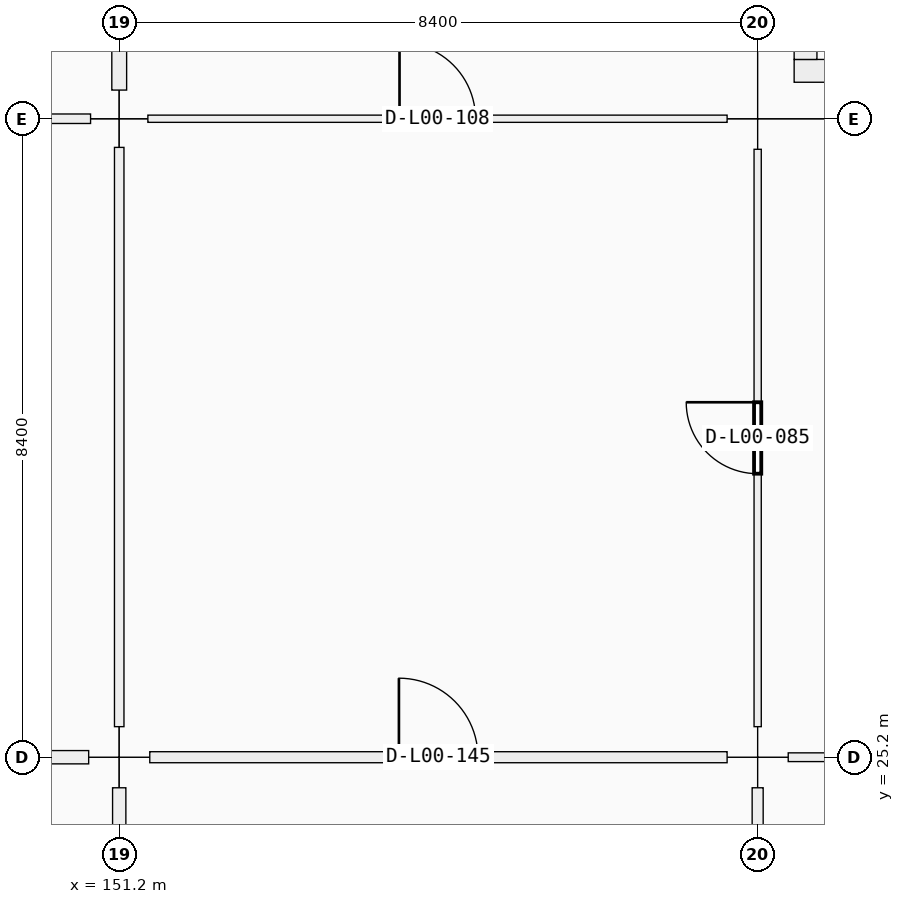
"""IFC4 building model, lengths in metres.
Left out: names, types, materials, properties, quantities, classifications, styles, units other than length and angle.
Written with IfcOpenShell. Run it as: python <this file> out.ifc"""

import sys

from ifc_helpers import new_model, si_unit, direction, frame, frame_2d, origin, origin_2d, place, context, subcontext, project, spatial, rectangle, extrude, element, fill, save


model = new_model("IFC4")
c1 = context("Model", 3, precision=1e-05, world=origin(), true_north=direction((0.0, 1.0)))
c2 = subcontext(c1, "Body", "Model", "MODEL_VIEW")
j1 = project(units=[si_unit("LENGTHUNIT", "METRE"), si_unit("PLANEANGLEUNIT", "RADIAN")], contexts=[c1])
p1 = place(None, origin())
s1 = spatial("IfcSite", under=j1, at=p1, CompositionType="ELEMENT")
p2 = place(p1, origin())
s2 = spatial("IfcBuilding", under=s1, at=p2, CompositionType="ELEMENT")
p3 = place(p2, origin())
s3 = spatial("IfcBuildingStorey", under=s2, at=p3, CompositionType="ELEMENT", Elevation=0.0)
p4 = place(p3, frame((151.2, 25.2, 0.0), z_axis=(0.0, 0.0, 1.0), x_axis=(1.0, 0.0, 0.0)))
e1 = element("IfcColumn", 1, at=p4, inside=s3, PredefinedType="COLUMN", context=c2, shape_type="SweptSolid", body=[
    extrude(rectangle(XDim=0.8, YDim=0.8, at=origin_2d()), origin(), (0.0, 0.0, 1.0), 5.76),
])
p5 = place(p3, frame((151.2, 33.6, 0.0), z_axis=(0.0, 0.0, 1.0), x_axis=(1.0, 0.0, 0.0)))
e2 = element("IfcColumn", 2, at=p5, inside=s3, PredefinedType="COLUMN", context=c2, shape_type="SweptSolid", body=[
    extrude(rectangle(XDim=0.75, YDim=0.75, at=origin_2d()), origin(), (0.0, 0.0, 1.0), 5.51),
])
for number, where, z_axis, x_axis in (
    (3, (159.6, 25.2, 0.0), (0.0, 0.0, 1.0), (1.0, 0.0, 0.0)),
    (4, (159.6, 33.6, 0.0), (0.0, 0.0, 1.0), (1.0, 0.0, 0.0)),
):
    element("IfcColumn", number, at=place(p3, frame(where, z_axis=z_axis, x_axis=x_axis)), inside=s3, PredefinedType="COLUMN", context=c2, shape_type="SweptSolid", body=[
        extrude(rectangle(XDim=0.8, YDim=0.8, at=origin_2d()), origin(), (0.0, 0.0, 1.0), 5.76),
    ])
p6 = place(p3, frame((167.52, 34.23, 0.0), z_axis=(0.0, 0.0, 1.0), x_axis=(-1.0, 0.0, 0.0)))
e5 = element("IfcWall", 5, at=p6, inside=s3, PredefinedType="SHEAR", context=c2, shape_type="SweptSolid", body=[
    extrude(rectangle(XDim=7.44, YDim=0.3, at=frame_2d((3.72, 0.0))), origin(), (0.0, 0.0, 1.0), 5.76),
])
p7 = place(p6, frame((1.28, 0.0, 0.0)))
e6 = element("IfcOpeningElement", 6, at=p7, cuts=e5, PredefinedType="OPENING", context=c2, shape_type="SweptSolid", body=[
    extrude(rectangle(XDim=1.5, YDim=2.15, at=frame_2d((0.75, 1.075))), frame((0.0, 0.15, 0.0), z_axis=(0.0, -1.0, 0.0), x_axis=(1.0, 0.0, 0.0)), (0.0, 0.0, 1.0), 0.3),
])
p8 = place(p3, frame((160.23, 34.38, 0.0), z_axis=(0.0, 0.0, 1.0), x_axis=(0.0, 1.0, 0.0)))
e7 = element("IfcWall", 7, at=p8, inside=s3, PredefinedType="SHEAR", context=c2, shape_type="SweptSolid", body=[
    extrude(rectangle(XDim=6.84, YDim=0.3, at=frame_2d((3.42, 0.0))), origin(), (0.0, 0.0, 1.0), 5.76),
])
p9 = place(p3, frame((143.202, 25.2, 0.0), z_axis=(0.0, 0.0, 1.0), x_axis=(1.0, 0.0, 0.0)))
e8 = element("IfcWall", 8, at=p9, inside=s3, PredefinedType="PARTITIONING", context=c2, shape_type="SweptSolid", body=[
    extrude(rectangle(XDim=7.596, YDim=0.175, at=frame_2d((3.798, 0.0))), origin(), (0.0, 0.0, 1.0), 3.66),
])
p10 = place(p9, frame((3.333, 0.0, 0.0)))
e9 = element("IfcOpeningElement", 9, at=p10, cuts=e8, PredefinedType="OPENING", context=c2, shape_type="SweptSolid", body=[
    extrude(rectangle(XDim=0.93, YDim=2.12, at=frame_2d((0.465, 1.06))), frame((0.0, 0.087, 0.0), z_axis=(0.0, -1.0, 0.0), x_axis=(1.0, 0.0, 0.0)), (0.0, 0.0, 1.0), 0.175),
])
p11 = place(p3, frame((143.202, 33.6, 0.0), z_axis=(0.0, 0.0, 1.0), x_axis=(1.0, 0.0, 0.0)))
e10 = element("IfcWall", 10, at=p11, inside=s3, PredefinedType="PARTITIONING", context=c2, shape_type="SweptSolid", body=[
    extrude(rectangle(XDim=7.621, YDim=0.125, at=frame_2d((3.811, 0.0))), origin(), (0.0, 0.0, 1.0), 3.66),
])
p12 = place(p11, frame((3.271, 0.0, 0.0)))
e11 = element("IfcOpeningElement", 11, at=p12, cuts=e10, PredefinedType="OPENING", context=c2, shape_type="SweptSolid", body=[
    extrude(rectangle(XDim=1.08, YDim=2.25, at=frame_2d((0.54, 1.125))), frame((0.0, 0.062, 0.0), z_axis=(0.0, -1.0, 0.0), x_axis=(1.0, 0.0, 0.0)), (0.0, 0.0, 1.0), 0.125),
])
p13 = place(p3, frame((151.602, 25.2, 0.0), z_axis=(0.0, 0.0, 1.0), x_axis=(1.0, 0.0, 0.0)))
e12 = element("IfcWall", 12, at=p13, inside=s3, PredefinedType="PARTITIONING", context=c2, shape_type="SweptSolid", body=[
    extrude(rectangle(XDim=7.596, YDim=0.145, at=frame_2d((3.798, 0.0))), origin(), (0.0, 0.0, 1.0), 3.66),
])
p14 = place(p13, frame((3.278, 0.0, 0.0)))
e13 = element("IfcOpeningElement", 13, at=p14, cuts=e12, PredefinedType="OPENING", context=c2, shape_type="SweptSolid", body=[
    extrude(rectangle(XDim=1.04, YDim=2.2, at=frame_2d((0.52, 1.1))), frame((0.0, 0.073, 0.0), z_axis=(0.0, -1.0, 0.0), x_axis=(1.0, 0.0, 0.0)), (0.0, 0.0, 1.0), 0.145),
])
p15 = place(p3, frame((151.577, 33.6, 0.0), z_axis=(0.0, 0.0, 1.0), x_axis=(1.0, 0.0, 0.0)))
e14 = element("IfcWall", 14, at=p15, inside=s3, PredefinedType="PARTITIONING", context=c2, shape_type="SweptSolid", body=[
    extrude(rectangle(XDim=7.621, YDim=0.095, at=frame_2d((3.811, 0.0))), origin(), (0.0, 0.0, 1.0), 3.66),
])
p16 = place(p15, frame((3.311, 0.0, 0.0)))
e15 = element("IfcOpeningElement", 15, at=p16, cuts=e14, PredefinedType="OPENING", context=c2, shape_type="SweptSolid", body=[
    extrude(rectangle(XDim=1.0, YDim=2.2, at=frame_2d((0.5, 1.1))), frame((0.0, 0.047, 0.0), z_axis=(0.0, -1.0, 0.0), x_axis=(1.0, 0.0, 0.0)), (0.0, 0.0, 1.0), 0.095),
])
p17 = place(p3, frame((160.002, 25.2, 0.0), z_axis=(0.0, 0.0, 1.0), x_axis=(1.0, 0.0, 0.0)))
e16 = element("IfcWall", 16, at=p17, inside=s3, PredefinedType="PARTITIONING", context=c2, shape_type="SweptSolid", body=[
    extrude(rectangle(XDim=7.596, YDim=0.115, at=frame_2d((3.798, 0.0))), origin(), (0.0, 0.0, 1.0), 3.66),
])
p18 = place(p17, frame((3.268, 0.0, 0.0)))
e17 = element("IfcOpeningElement", 17, at=p18, cuts=e16, PredefinedType="OPENING", context=c2, shape_type="SweptSolid", body=[
    extrude(rectangle(XDim=1.06, YDim=2.25, at=frame_2d((0.53, 1.125))), frame((0.0, 0.058, 0.0), z_axis=(0.0, -1.0, 0.0), x_axis=(1.0, 0.0, 0.0)), (0.0, 0.0, 1.0), 0.115),
])
p19 = place(p3, frame((151.2, 17.202, 0.0), z_axis=(0.0, 0.0, 1.0), x_axis=(0.0, 1.0, 0.0)))
e18 = element("IfcWall", 18, at=p19, inside=s3, PredefinedType="PARTITIONING", context=c2, shape_type="SweptSolid", body=[
    extrude(rectangle(XDim=7.596, YDim=0.175, at=frame_2d((3.798, 0.0))), origin(), (0.0, 0.0, 1.0), 3.66),
])
p20 = place(p19, frame((3.278, 0.0, 0.0)))
e19 = element("IfcOpeningElement", 19, at=p20, cuts=e18, PredefinedType="OPENING", context=c2, shape_type="SweptSolid", body=[
    extrude(rectangle(XDim=1.04, YDim=2.2, at=frame_2d((0.52, 1.1))), frame((0.0, 0.087, 0.0), z_axis=(0.0, -1.0, 0.0), x_axis=(1.0, 0.0, 0.0)), (0.0, 0.0, 1.0), 0.175),
])
p21 = place(p3, frame((151.2, 25.602, 0.0), z_axis=(0.0, 0.0, 1.0), x_axis=(0.0, 1.0, 0.0)))
e20 = element("IfcWall", 20, at=p21, inside=s3, PredefinedType="PARTITIONING", context=c2, shape_type="SweptSolid", body=[
    extrude(rectangle(XDim=7.621, YDim=0.125, at=frame_2d((3.811, 0.0))), origin(), (0.0, 0.0, 1.0), 3.66),
])
p22 = place(p21, frame((3.301, 0.0, 0.0)))
e21 = element("IfcOpeningElement", 21, at=p22, cuts=e20, PredefinedType="OPENING", context=c2, shape_type="SweptSolid", body=[
    extrude(rectangle(XDim=1.02, YDim=2.2, at=frame_2d((0.51, 1.1))), frame((0.0, 0.062, 0.0), z_axis=(0.0, -1.0, 0.0), x_axis=(1.0, 0.0, 0.0)), (0.0, 0.0, 1.0), 0.125),
])
p23 = place(p3, frame((151.2, 33.977, 0.0), z_axis=(0.0, 0.0, 1.0), x_axis=(0.0, 1.0, 0.0)))
e22 = element("IfcWall", 22, at=p23, inside=s3, PredefinedType="PARTITIONING", context=c2, shape_type="SweptSolid", body=[
    extrude(rectangle(XDim=7.671, YDim=0.195, at=frame_2d((3.835, 0.0))), origin(), (0.0, 0.0, 1.0), 3.66),
])
p24 = place(p23, frame((3.336, 0.0, 0.0)))
e23 = element("IfcOpeningElement", 23, at=p24, cuts=e22, PredefinedType="OPENING", context=c2, shape_type="SweptSolid", body=[
    extrude(rectangle(XDim=1.0, YDim=2.2, at=frame_2d((0.5, 1.1))), frame((0.0, 0.098, 0.0), z_axis=(0.0, -1.0, 0.0), x_axis=(1.0, 0.0, 0.0)), (0.0, 0.0, 1.0), 0.195),
])
p25 = place(p3, frame((159.6, 17.202, 0.0), z_axis=(0.0, 0.0, 1.0), x_axis=(0.0, 1.0, 0.0)))
e24 = element("IfcWall", 24, at=p25, inside=s3, PredefinedType="PARTITIONING", context=c2, shape_type="SweptSolid", body=[
    extrude(rectangle(XDim=7.596, YDim=0.145, at=frame_2d((3.798, 0.0))), origin(), (0.0, 0.0, 1.0), 3.66),
])
p26 = place(p25, frame((3.273, 0.0, 0.0)))
e25 = element("IfcOpeningElement", 25, at=p26, cuts=e24, PredefinedType="OPENING", context=c2, shape_type="SweptSolid", body=[
    extrude(rectangle(XDim=1.05, YDim=2.12, at=frame_2d((0.525, 1.06))), frame((0.0, 0.073, 0.0), z_axis=(0.0, -1.0, 0.0), x_axis=(1.0, 0.0, 0.0)), (0.0, 0.0, 1.0), 0.145),
])
p27 = place(p3, frame((159.6, 25.602, 0.0), z_axis=(0.0, 0.0, 1.0), x_axis=(0.0, 1.0, 0.0)))
e26 = element("IfcWall", 26, at=p27, inside=s3, PredefinedType="PARTITIONING", context=c2, shape_type="SweptSolid", body=[
    extrude(rectangle(XDim=7.596, YDim=0.095, at=frame_2d((3.798, 0.0))), origin(), (0.0, 0.0, 1.0), 3.66),
])
p28 = place(p27, frame((3.328, 0.0, 0.0)))
e27 = element("IfcOpeningElement", 27, at=p28, cuts=e26, PredefinedType="OPENING", context=c2, shape_type="SweptSolid", body=[
    extrude(rectangle(XDim=0.94, YDim=2.15, at=frame_2d((0.47, 1.075))), frame((0.0, 0.047, 0.0), z_axis=(0.0, -1.0, 0.0), x_axis=(1.0, 0.0, 0.0)), (0.0, 0.0, 1.0), 0.095),
])
p29 = place(p28, origin())
e28 = element("IfcDoor", 28, at=p29, inside=s3, OperationType="SINGLE_SWING_RIGHT", PredefinedType="DOOR", context=c2, shape_type="SweptSolid", body=[
    extrude(rectangle(XDim=0.94, YDim=2.15, at=frame_2d((0.47, 1.075))), frame((0.0, 0.025, 0.0), z_axis=(0.0, -1.0, 0.0), x_axis=(1.0, 0.0, 0.0)), (0.0, 0.0, 1.0), 0.05),
])
fill(e27, e28)
p30 = place(p16, origin())
e29 = element("IfcDoor", 29, at=p30, inside=s3, OperationType="SINGLE_SWING_LEFT", PredefinedType="DOOR", context=c2, shape_type="SweptSolid", body=[
    extrude(rectangle(XDim=1.0, YDim=2.2, at=frame_2d((0.5, 1.1))), frame((0.0, 0.025, 0.0), z_axis=(0.0, -1.0, 0.0), x_axis=(1.0, 0.0, 0.0)), (0.0, 0.0, 1.0), 0.05),
])
fill(e15, e29)
p31 = place(p14, origin())
e30 = element("IfcDoor", 30, at=p31, inside=s3, OperationType="SINGLE_SWING_LEFT", PredefinedType="DOOR", context=c2, shape_type="SweptSolid", body=[
    extrude(rectangle(XDim=1.04, YDim=2.2, at=frame_2d((0.52, 1.1))), frame((0.0, 0.025, 0.0), z_axis=(0.0, -1.0, 0.0), x_axis=(1.0, 0.0, 0.0)), (0.0, 0.0, 1.0), 0.05),
])
fill(e13, e30)
p32 = place(p22, origin())
e31 = element("IfcDoor", 31, at=p32, inside=s3, OperationType="SINGLE_SWING_LEFT", PredefinedType="DOOR", context=c2, shape_type="SweptSolid", body=[
    extrude(rectangle(XDim=1.02, YDim=2.2, at=frame_2d((0.51, 1.1))), frame((0.0, 0.025, 0.0), z_axis=(0.0, -1.0, 0.0), x_axis=(1.0, 0.0, 0.0)), (0.0, 0.0, 1.0), 0.05),
])
fill(e21, e31)
save(model, sys.argv[1])
